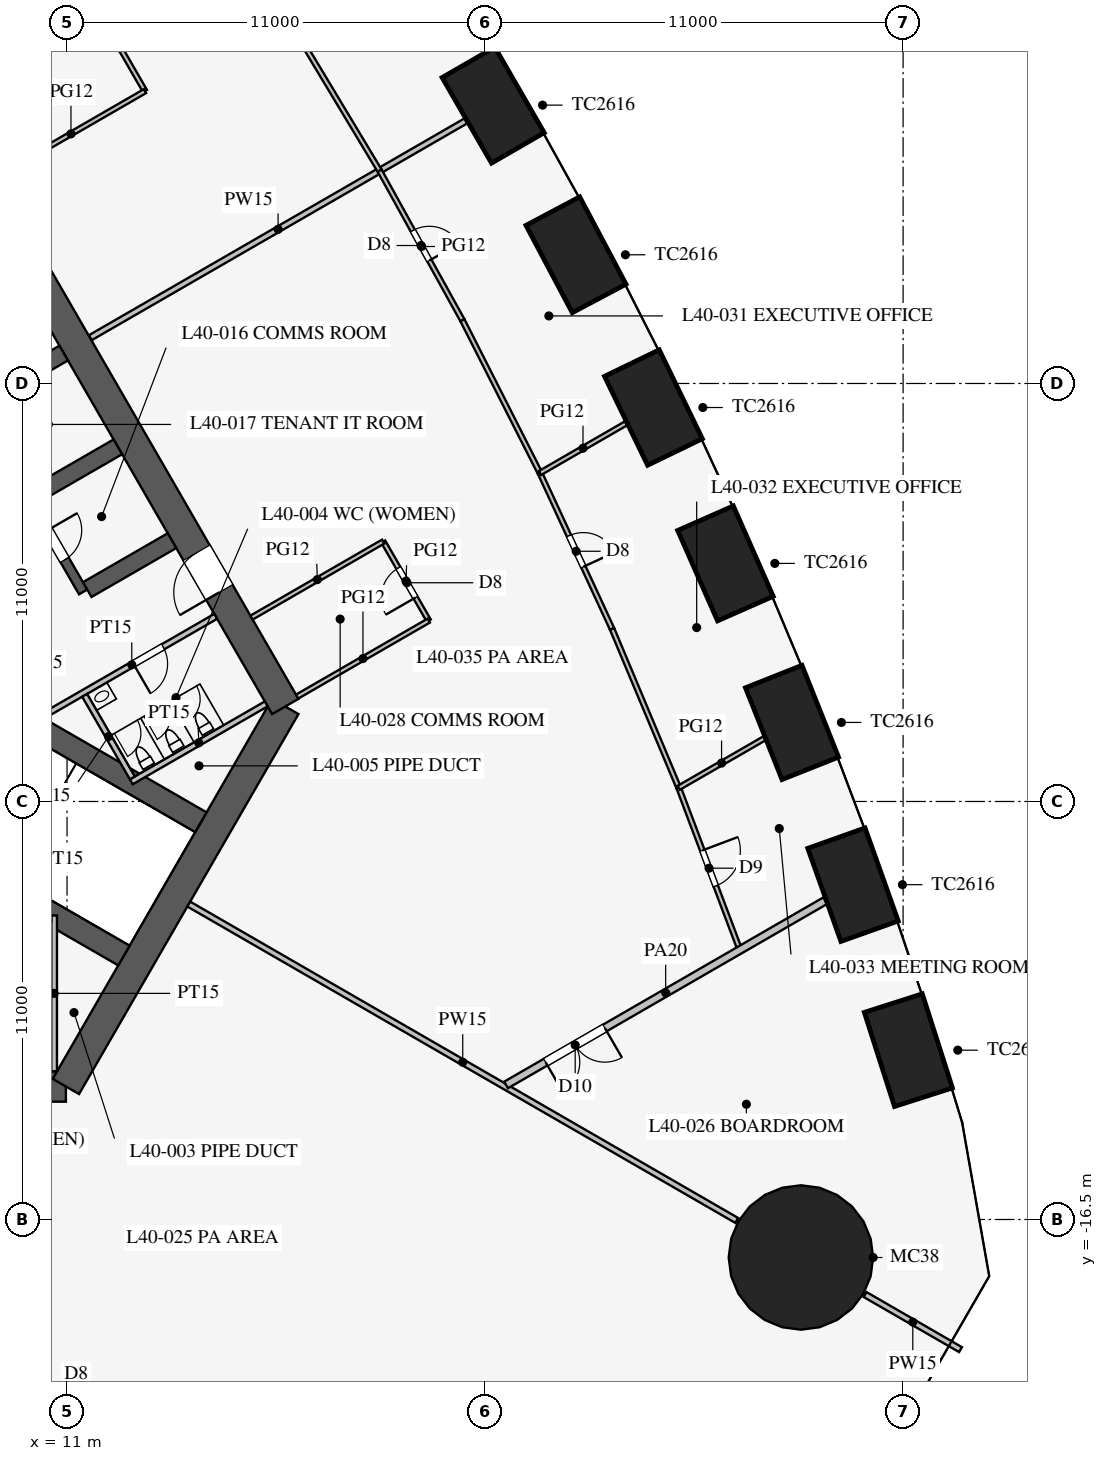
"""IFC4 building model, lengths in metres.
Left out: names, types, materials, properties, quantities, classifications, styles, units other than length and angle.
Written with IfcOpenShell. Run it as: python <this file> out.ifc"""

import sys

from ifc_helpers import new_model, si_unit, direction, frame, frame_2d, origin, origin_2d, place, context, subcontext, project, spatial, rectangle, circle, extrude, element, fill, save


model = new_model("IFC4")
c1 = context("Model", 3, precision=1e-05, world=origin(), true_north=direction((0.0, 1.0)))
c2 = subcontext(c1, "Body", "Model", "MODEL_VIEW")
j1 = project(units=[si_unit("LENGTHUNIT", "METRE"), si_unit("PLANEANGLEUNIT", "RADIAN")], contexts=[c1])
p1 = place(None, origin())
s1 = spatial("IfcSite", under=j1, at=p1, CompositionType="ELEMENT")
p2 = place(p1, origin())
s2 = spatial("IfcBuilding", under=s1, at=p2, CompositionType="ELEMENT")
p3 = place(p2, frame((0.0, 0.0, 174.5)))
s3 = spatial("IfcBuildingStorey", under=s2, at=p3, CompositionType="ELEMENT", Elevation=174.5)
for number, where, z_axis, x_axis in (
    (1, (33.139, -12.044, 0.0), (0.0, 0.0, 1.0), (-0.305, 0.952, 0.0)),
    (2, (31.682, -7.689, 0.0), (0.0, 0.0, 1.0), (-0.336, 0.942, 0.0)),
    (3, (30.077, -3.42, 0.0), (0.0, 0.0, 1.0), (-0.37, 0.929, 0.0)),
    (4, (28.325, 0.765, 0.0), (0.0, 0.0, 1.0), (-0.403, 0.915, 0.0)),
    (5, (26.43, 4.867, 0.0), (0.0, 0.0, 1.0), (-0.436, 0.9, 0.0)),
    (6, (24.393, 8.887, 0.0), (0.0, 0.0, 1.0), (-0.468, 0.883, 0.0)),
    (7, (22.213, 12.825, 0.0), (0.0, 0.0, 1.0), (-0.5, 0.866, 0.0)),
):
    element("IfcColumn", number, at=place(p3, frame(where, z_axis=z_axis, x_axis=x_axis)), inside=s3, PredefinedType="COLUMN", context=c2, shape_type="SweptSolid", body=[
        extrude(rectangle(XDim=2.6, YDim=1.6, at=origin_2d()), origin(), (0.0, 0.0, 1.0), 4.2),
    ])
p4 = place(p3, frame((30.311, -17.5, 0.0), z_axis=(0.0, 0.0, 1.0), x_axis=(1.0, 0.0, 0.0)))
e8 = element("IfcColumn", 8, at=p4, inside=s3, PredefinedType="COLUMN", context=c2, shape_type="SweptSolid", body=[
    extrude(circle(Radius=1.9, at=origin_2d()), origin(), (0.0, 0.0, 1.0), 4.2),
])
p5 = place(p3, frame((-10.97, -13.0, 0.0), z_axis=(0.0, 0.0, 1.0), x_axis=(1.0, 0.0, 0.0)))
e9 = element("IfcWall", 9, at=p5, inside=s3, PredefinedType="SHEAR", context=c2, shape_type="SweptSolid", body=[
    extrude(rectangle(XDim=21.939, YDim=0.8, at=frame_2d((10.97, 0.0))), origin(), (0.0, 0.0, 1.0), 4.2),
])
p6 = place(p5, frame((17.27, 0.0, 0.0)))
e10 = element("IfcOpeningElement", 10, at=p6, cuts=e9, PredefinedType="OPENING", context=c2, shape_type="SweptSolid", body=[
    extrude(rectangle(XDim=1.2, YDim=2.1, at=frame_2d((0.6, 1.05))), frame((0.0, 0.41, 0.0), z_axis=(0.0, -1.0, 0.0), x_axis=(1.0, 0.0, 0.0)), (0.0, 0.0, 1.0), 0.82),
])
p7 = place(p5, frame((3.47, 0.0, 0.0)))
e11 = element("IfcOpeningElement", 11, at=p7, cuts=e9, PredefinedType="OPENING", context=c2, shape_type="SweptSolid", body=[
    extrude(rectangle(XDim=1.2, YDim=2.1, at=frame_2d((0.6, 1.05))), frame((0.0, 0.41, 0.0), z_axis=(0.0, -1.0, 0.0), x_axis=(1.0, 0.0, 0.0)), (0.0, 0.0, 1.0), 0.82),
])
p8 = place(p3, frame((10.97, -13.0, 0.0), z_axis=(0.0, 0.0, 1.0), x_axis=(0.499995765644, 0.866027848477, 0.0)))
e12 = element("IfcWall", 12, at=p8, inside=s3, PredefinedType="SHEAR", context=c2, shape_type="SweptSolid", body=[
    extrude(rectangle(XDim=11.547, YDim=0.8, at=frame_2d((5.773, 0.0))), origin(), (0.0, 0.0, 1.0), 4.2),
])
p9 = place(p3, frame((16.743, -3.0, 0.0), z_axis=(0.0, 0.0, 1.0), x_axis=(-0.500002442456, 0.866023993627, 0.0)))
e13 = element("IfcWall", 13, at=p9, inside=s3, PredefinedType="SHEAR", context=c2, shape_type="SweptSolid", body=[
    extrude(rectangle(XDim=21.939, YDim=0.8, at=frame_2d((10.97, 0.0))), origin(), (0.0, 0.0, 1.0), 4.2),
])
p10 = place(p9, frame((17.27, 0.0, 0.0)))
e14 = element("IfcOpeningElement", 14, at=p10, cuts=e13, PredefinedType="OPENING", context=c2, shape_type="SweptSolid", body=[
    extrude(rectangle(XDim=1.2, YDim=2.1, at=frame_2d((0.6, 1.05))), frame((0.0, 0.41, 0.0), z_axis=(0.0, -1.0, 0.0), x_axis=(1.0, 0.0, 0.0)), (0.0, 0.0, 1.0), 0.82),
])
p11 = place(p9, frame((3.47, 0.0, 0.0)))
e15 = element("IfcOpeningElement", 15, at=p11, cuts=e13, PredefinedType="OPENING", context=c2, shape_type="SweptSolid", body=[
    extrude(rectangle(XDim=1.2, YDim=2.1, at=frame_2d((0.6, 1.05))), frame((0.0, 0.41, 0.0), z_axis=(0.0, -1.0, 0.0), x_axis=(1.0, 0.0, 0.0)), (0.0, 0.0, 1.0), 0.82),
])
p12 = place(p3, frame((11.424, 0.014, 0.0), z_axis=(0.0, 0.0, 1.0), x_axis=(-0.500001763848, 0.866024385424, 0.0)))
e16 = element("IfcWall", 16, at=p12, inside=s3, PredefinedType="SHEAR", context=c2, shape_type="SweptSolid", body=[
    extrude(rectangle(XDim=11.4, YDim=0.25, at=frame_2d((5.7, 0.0))), origin(), (0.0, 0.0, 1.0), 4.2),
])
p13 = place(p12, frame((0.975, 0.0, 0.0)))
e17 = element("IfcOpeningElement", 17, at=p13, cuts=e16, PredefinedType="OPENING", context=c2, shape_type="SweptSolid", body=[
    extrude(rectangle(XDim=0.9, YDim=2.1, at=frame_2d((0.45, 1.05))), frame((0.0, 0.135, 0.0), z_axis=(0.0, -1.0, 0.0), x_axis=(1.0, 0.0, 0.0)), (0.0, 0.0, 1.0), 0.27),
])
p14 = place(p12, frame((3.825, 0.0, 0.0)))
e18 = element("IfcOpeningElement", 18, at=p14, cuts=e16, PredefinedType="OPENING", context=c2, shape_type="SweptSolid", body=[
    extrude(rectangle(XDim=0.9, YDim=2.1, at=frame_2d((0.45, 1.05))), frame((0.0, 0.135, 0.0), z_axis=(0.0, -1.0, 0.0), x_axis=(1.0, 0.0, 0.0)), (0.0, 0.0, 1.0), 0.27),
])
for number, where, z_axis, x_axis in (
    (19, (11.532, 0.076, 0.0), (0.0, 0.0, 1.0), (0.866, 0.5, 0.0)),
    (20, (10.107, 2.544, 0.0), (0.0, 0.0, 1.0), (0.866, 0.5, 0.0)),
    (21, (8.682, 5.012, 0.0), (0.0, 0.0, 1.0), (0.866, 0.5, 0.0)),
):
    element("IfcWall", number, at=place(p3, frame(where, z_axis=z_axis, x_axis=x_axis)), inside=s3, PredefinedType="SHEAR", context=c2, shape_type="SweptSolid", body=[
        extrude(rectangle(XDim=2.575, YDim=0.45, at=frame_2d((1.288, 0.0))), origin(), (0.0, 0.0, 1.0), 4.2),
    ])
for number, where, z_axis, x_axis in (
    (22, (4.638, -5.016, 0.0), (0.0, 0.0, 1.0), (0.866, -0.5, 0.0)),
    (23, (6.663, -1.509, 0.0), (0.0, 0.0, 1.0), (0.866, -0.5, 0.0)),
):
    element("IfcWall", number, at=place(p3, frame(where, z_axis=z_axis, x_axis=x_axis)), inside=s3, PredefinedType="SHEAR", context=c2, shape_type="SweptSolid", body=[
        extrude(rectangle(XDim=9.075, YDim=0.6, at=frame_2d((4.538, 0.0))), origin(), (0.0, 0.0, 1.0), 4.2),
    ])
p15 = place(p3, frame((10.495, -3.178, 0.0), z_axis=(0.0, 0.0, 1.0), x_axis=(0.86602216432, 0.500005610874, 0.0)))
e24 = element("IfcWall", 24, at=p15, inside=s3, PredefinedType="PARTITIONING", context=c2, shape_type="SweptSolid", body=[
    extrude(rectangle(XDim=5.1, YDim=0.15, at=frame_2d((2.55, 0.0))), origin(), (0.0, 0.0, 1.0), 3.95),
])
p16 = place(p15, frame((2.6, 0.0, 0.0)))
e25 = element("IfcOpeningElement", 25, at=p16, cuts=e24, PredefinedType="OPENING", context=c2, shape_type="SweptSolid", body=[
    extrude(rectangle(XDim=0.9, YDim=2.1, at=frame_2d((0.45, 1.05))), frame((0.0, 0.085, 0.0), z_axis=(0.0, -1.0, 0.0), x_axis=(1.0, 0.0, 0.0)), (0.0, 0.0, 1.0), 0.17),
])
for number, where, z_axis, x_axis in (
    (26, (10.66, -8.5, 0.0), (0.0, 0.0, 1.0), (0.0, -1.0, 0.0)),
    (27, (12.691, -4.982, 0.0), (0.0, 0.0, 1.0), (0.866, 0.5, 0.0)),
):
    element("IfcWall", number, at=place(p3, frame(where, z_axis=z_axis, x_axis=x_axis)), inside=s3, PredefinedType="PARTITIONING", context=c2, shape_type="SweptSolid", body=[
        extrude(rectangle(XDim=4.1, YDim=0.15, at=frame_2d((2.05, 0.0))), origin(), (0.0, 0.0, 1.0), 3.95),
    ])
p17 = place(p3, frame((11.464, -2.706, 0.0), z_axis=(0.0, 0.0, 1.0), x_axis=(0.50001992892, -0.866013897511, 0.0)))
e28 = element("IfcWall", 28, at=p17, inside=s3, PredefinedType="PARTITIONING", context=c2, shape_type="SweptSolid", body=[
    extrude(rectangle(XDim=2.51, YDim=0.15, at=frame_2d((1.255, 0.0))), origin(), (0.0, 0.0, 1.0), 3.95),
])
p18 = place(p3, frame((14.203, -8.2, 0.0), z_axis=(0.0, 0.0, 1.0), x_axis=(0.866024668836, -0.500001272966, 0.0)))
e29 = element("IfcWall", 29, at=p18, inside=s3, PredefinedType="PARTITIONING", context=c2, shape_type="SweptSolid", body=[
    extrude(rectangle(XDim=16.65, YDim=0.15, at=frame_2d((8.325, 0.0))), origin(), (0.0, 0.0, 1.0), 1.95),
])
p19 = place(p3, frame((32.0, -18.475, 0.0), z_axis=(0.0, 0.0, 1.0), x_axis=(0.866042548026, -0.499970304126, 0.0)))
e30 = element("IfcWall", 30, at=p19, inside=s3, PredefinedType="PARTITIONING", context=c2, shape_type="SweptSolid", body=[
    extrude(rectangle(XDim=2.899, YDim=0.15, at=frame_2d((1.45, 0.0))), origin(), (0.0, 0.0, 1.0), 1.95),
])
p20 = place(p3, frame((11.613, 6.705, 0.0), z_axis=(0.0, 0.0, 1.0), x_axis=(0.866026306654, 0.499998436182, 0.0)))
e31 = element("IfcWall", 31, at=p20, inside=s3, PredefinedType="PARTITIONING", context=c2, shape_type="SweptSolid", body=[
    extrude(rectangle(XDim=11.41, YDim=0.15, at=frame_2d((5.705, 0.0))), origin(), (0.0, 0.0, 1.0), 2.15),
])
p21 = place(p3, frame((13.052, 13.194, 0.0), z_axis=(0.0, 0.0, 1.0), x_axis=(-0.499977259774, 0.866038532462, 0.0)))
e32 = element("IfcWall", 32, at=p21, inside=s3, PredefinedType="PARTITIONING", context=c2, shape_type="SweptSolid", body=[
    extrude(rectangle(XDim=4.7, YDim=0.12, at=frame_2d((2.35, 0.0))), origin(), (0.0, 0.0, 1.0), 2.9),
])
p22 = place(p21, frame((1.45, 0.0, 0.15)))
e33 = element("IfcOpeningElement", 33, at=p22, cuts=e32, PredefinedType="OPENING", context=c2, shape_type="SweptSolid", body=[
    extrude(rectangle(XDim=1.8, YDim=2.1, at=frame_2d((0.9, 1.05))), frame((0.0, 0.07, 0.0), z_axis=(0.0, -1.0, 0.0), x_axis=(1.0, 0.0, 0.0)), (0.0, 0.0, 1.0), 0.14),
])
p23 = place(p3, frame((20.519, -0.74, 0.0), z_axis=(0.0, 0.0, 1.0), x_axis=(-0.499957262057, 0.866050077142, 0.0)))
e34 = element("IfcWall", 34, at=p23, inside=s3, PredefinedType="PARTITIONING", context=c2, shape_type="SweptSolid", body=[
    extrude(rectangle(XDim=2.4, YDim=0.12, at=frame_2d((1.2, 0.0))), origin(), (0.0, 0.0, 1.0), 2.9),
])
p24 = place(p23, frame((0.7, 0.0, 0.15)))
e35 = element("IfcOpeningElement", 35, at=p24, cuts=e34, PredefinedType="OPENING", context=c2, shape_type="SweptSolid", body=[
    extrude(rectangle(XDim=0.9, YDim=2.1, at=frame_2d((0.45, 1.05))), frame((0.0, 0.07, 0.0), z_axis=(0.0, -1.0, 0.0), x_axis=(1.0, 0.0, 0.0)), (0.0, 0.0, 1.0), 0.14),
])
p25 = place(p3, frame((9.155, 10.944, 0.0), z_axis=(0.0, 0.0, 1.0), x_axis=(0.866017533419, 0.500013631625, 0.0)))
e36 = element("IfcWall", 36, at=p25, inside=s3, PredefinedType="PARTITIONING", context=c2, shape_type="SweptSolid", body=[
    extrude(rectangle(XDim=4.5, YDim=0.12, at=frame_2d((2.25, 0.0))), origin(), (0.0, 0.0, 1.0), 2.9),
])
for number, where, z_axis, x_axis in (
    (37, (17.055, -2.74, 0.0), (0.0, 0.0, 1.0), (0.866, 0.5, 0.0)),
    (38, (15.855, -0.661, 0.0), (0.0, 0.0, 1.0), (0.866, 0.5, 0.0)),
):
    element("IfcWall", number, at=place(p3, frame(where, z_axis=z_axis, x_axis=x_axis)), inside=s3, PredefinedType="PARTITIONING", context=c2, shape_type="SweptSolid", body=[
        extrude(rectangle(XDim=4.0, YDim=0.12, at=frame_2d((2.0, 0.0))), origin(), (0.0, 0.0, 1.0), 2.9),
    ])
p26 = place(p3, frame((19.226, 11.1, 0.0), z_axis=(0.0, 0.0, 1.0), x_axis=(-0.515548366618, 0.856860479703, 0.0)))
e39 = element("IfcWall", 39, at=p26, inside=s3, PredefinedType="PARTITIONING", context=c2, shape_type="SweptSolid", body=[
    extrude(rectangle(XDim=4.501, YDim=0.12, at=frame_2d((2.25, 0.0))), origin(), (0.0, 0.0, 1.0), 2.9),
])
p27 = place(p3, frame((25.342, -0.958, 0.0), z_axis=(0.0, 0.0, 1.0), x_axis=(-0.419883773418, 0.907577884713, 0.0)))
e40 = element("IfcWall", 40, at=p27, inside=s3, PredefinedType="PARTITIONING", context=c2, shape_type="SweptSolid", body=[
    extrude(rectangle(XDim=4.519, YDim=0.12, at=frame_2d((2.259, 0.0))), origin(), (0.0, 0.0, 1.0), 2.9),
])
p28 = place(p27, frame((1.8, 0.0, 0.15)))
e41 = element("IfcOpeningElement", 41, at=p28, cuts=e40, PredefinedType="OPENING", context=c2, shape_type="SweptSolid", body=[
    extrude(rectangle(XDim=0.9, YDim=2.1, at=frame_2d((0.45, 1.05))), frame((0.0, 0.07, 0.0), z_axis=(0.0, -1.0, 0.0), x_axis=(1.0, 0.0, 0.0)), (0.0, 0.0, 1.0), 0.14),
])
p29 = place(p3, frame((27.096, -5.141, 0.0), z_axis=(0.0, 0.0, 1.0), x_axis=(-0.386807881778, 0.922160323693, 0.0)))
e42 = element("IfcWall", 42, at=p29, inside=s3, PredefinedType="PARTITIONING", context=c2, shape_type="SweptSolid", body=[
    extrude(rectangle(XDim=4.536, YDim=0.12, at=frame_2d((2.268, 0.0))), origin(), (0.0, 0.0, 1.0), 2.9),
])
p30 = place(p3, frame((28.706, -9.408, 0.0), z_axis=(0.0, 0.0, 1.0), x_axis=(-0.352894560512, 0.93566309597, 0.0)))
e43 = element("IfcWall", 43, at=p30, inside=s3, PredefinedType="PARTITIONING", context=c2, shape_type="SweptSolid", body=[
    extrude(rectangle(XDim=4.561, YDim=0.12, at=frame_2d((2.28, 0.0))), origin(), (0.0, 0.0, 1.0), 2.9),
])
p31 = place(p30, frame((1.8, 0.0, 0.15)))
e44 = element("IfcOpeningElement", 44, at=p31, cuts=e43, PredefinedType="OPENING", context=c2, shape_type="SweptSolid", body=[
    extrude(rectangle(XDim=1.0, YDim=2.1, at=frame_2d((0.5, 1.05))), frame((0.0, 0.07, 0.0), z_axis=(0.0, -1.0, 0.0), x_axis=(1.0, 0.0, 0.0)), (0.0, 0.0, 1.0), 0.14),
])
p32 = place(p3, frame((21.405, 7.162, 0.0), z_axis=(0.0, 0.0, 1.0), x_axis=(-0.484292898211, 0.874905931368, 0.0)))
e45 = element("IfcWall", 45, at=p32, inside=s3, PredefinedType="PARTITIONING", context=c2, shape_type="SweptSolid", body=[
    extrude(rectangle(XDim=4.501, YDim=0.12, at=frame_2d((2.25, 0.0))), origin(), (0.0, 0.0, 1.0), 2.9),
])
p33 = place(p32, frame((1.8, 0.0, 0.15)))
e46 = element("IfcOpeningElement", 46, at=p33, cuts=e45, PredefinedType="OPENING", context=c2, shape_type="SweptSolid", body=[
    extrude(rectangle(XDim=0.9, YDim=2.1, at=frame_2d((0.45, 1.05))), frame((0.0, 0.07, 0.0), z_axis=(0.0, -1.0, 0.0), x_axis=(1.0, 0.0, 0.0)), (0.0, 0.0, 1.0), 0.14),
])
p34 = place(p3, frame((23.444, 3.143, 0.0), z_axis=(0.0, 0.0, 1.0), x_axis=(-0.452471679136, 0.891778772779, 0.0)))
e47 = element("IfcWall", 47, at=p34, inside=s3, PredefinedType="PARTITIONING", context=c2, shape_type="SweptSolid", body=[
    extrude(rectangle(XDim=4.507, YDim=0.12, at=frame_2d((2.253, 0.0))), origin(), (0.0, 0.0, 1.0), 2.9),
])
p35 = place(p3, frame((27.096, -5.141, 0.0), z_axis=(0.0, 0.0, 1.0), x_axis=(0.866012205188, 0.500022859943, 0.0)))
e48 = element("IfcWall", 48, at=p35, inside=s3, PredefinedType="PARTITIONING", context=c2, shape_type="SweptSolid", body=[
    extrude(rectangle(XDim=2.603, YDim=0.12, at=frame_2d((1.302, 0.0))), origin(), (0.0, 0.0, 1.0), 2.15),
])
p36 = place(p3, frame((22.553, -12.96, 0.0), z_axis=(0.0, 0.0, 1.0), x_axis=(0.866028367999, 0.499994865794, 0.0)))
e49 = element("IfcWall", 49, at=p36, inside=s3, PredefinedType="PARTITIONING", context=c2, shape_type="SweptSolid", body=[
    extrude(rectangle(XDim=9.697, YDim=0.2, at=frame_2d((4.849, 0.0))), origin(), (0.0, 0.0, 1.0), 2.35),
])
p37 = place(p36, frame((1.2, 0.0, 0.15)))
e50 = element("IfcOpeningElement", 50, at=p37, cuts=e49, PredefinedType="OPENING", context=c2, shape_type="SweptSolid", body=[
    extrude(rectangle(XDim=1.8, YDim=2.1, at=frame_2d((0.9, 1.05))), frame((0.0, 0.11, 0.0), z_axis=(0.0, -1.0, 0.0), x_axis=(1.0, 0.0, 0.0)), (0.0, 0.0, 1.0), 0.22),
])
p38 = place(p3, frame((23.444, 3.143, 0.0), z_axis=(0.0, 0.0, 1.0), x_axis=(0.866011491631, 0.500024095782, 0.0)))
e51 = element("IfcWall", 51, at=p38, inside=s3, PredefinedType="PARTITIONING", context=c2, shape_type="SweptSolid", body=[
    extrude(rectangle(XDim=2.615, YDim=0.12, at=frame_2d((1.308, 0.0))), origin(), (0.0, 0.0, 1.0), 2.35),
])
p39 = place(p16, frame((0.9, 0.0, 0.0), z_axis=(0.0, 0.0, 1.0), x_axis=(-1.0, 0.0, 0.0)))
e52 = element("IfcDoor", 52, at=p39, inside=s3, OperationType="SINGLE_SWING_RIGHT", PredefinedType="DOOR", context=c2, shape_type="SweptSolid", body=[
    extrude(rectangle(XDim=0.9, YDim=2.1, at=frame_2d((0.45, 1.05))), frame((0.0, 0.025, 0.0), z_axis=(0.0, -1.0, 0.0), x_axis=(1.0, 0.0, 0.0)), (0.0, 0.0, 1.0), 0.05),
])
fill(e25, e52)
p40 = place(p11, origin())
e53 = element("IfcDoor", 53, at=p40, inside=s3, OperationType="SINGLE_SWING_LEFT", PredefinedType="DOOR", context=c2, shape_type="SweptSolid", body=[
    extrude(rectangle(XDim=1.2, YDim=2.1, at=frame_2d((0.6, 1.05))), frame((0.0, 0.025, 0.0), z_axis=(0.0, -1.0, 0.0), x_axis=(1.0, 0.0, 0.0)), (0.0, 0.0, 1.0), 0.05),
])
fill(e15, e53)
p41 = place(p13, frame((0.9, 0.0, 0.0), z_axis=(0.0, 0.0, 1.0), x_axis=(-1.0, 0.0, 0.0)))
e54 = element("IfcDoor", 54, at=p41, inside=s3, OperationType="SINGLE_SWING_LEFT", PredefinedType="DOOR", context=c2, shape_type="SweptSolid", body=[
    extrude(rectangle(XDim=0.9, YDim=2.1, at=frame_2d((0.45, 1.05))), frame((0.0, 0.025, 0.0), z_axis=(0.0, -1.0, 0.0), x_axis=(1.0, 0.0, 0.0)), (0.0, 0.0, 1.0), 0.05),
])
fill(e17, e54)
p42 = place(p37, frame((1.8, 0.0, 0.0), z_axis=(0.0, 0.0, 1.0), x_axis=(-1.0, 0.0, 0.0)))
e55 = element("IfcDoor", 55, at=p42, inside=s3, OperationType="DOUBLE_DOOR_SINGLE_SWING", PredefinedType="DOOR", context=c2, shape_type="SweptSolid", body=[
    extrude(rectangle(XDim=1.8, YDim=2.1, at=frame_2d((0.9, 1.05))), frame((0.0, 0.025, 0.0), z_axis=(0.0, -1.0, 0.0), x_axis=(1.0, 0.0, 0.0)), (0.0, 0.0, 1.0), 0.05),
])
fill(e50, e55)
p43 = place(p24, origin())
e56 = element("IfcDoor", 56, at=p43, inside=s3, OperationType="SINGLE_SWING_LEFT", PredefinedType="DOOR", context=c2, shape_type="SweptSolid", body=[
    extrude(rectangle(XDim=0.9, YDim=2.1, at=frame_2d((0.45, 1.05))), frame((0.0, 0.025, 0.0), z_axis=(0.0, -1.0, 0.0), x_axis=(1.0, 0.0, 0.0)), (0.0, 0.0, 1.0), 0.05),
])
fill(e35, e56)
p44 = place(p33, frame((0.9, 0.0, 0.0), z_axis=(0.0, 0.0, 1.0), x_axis=(-1.0, 0.0, 0.0)))
e57 = element("IfcDoor", 57, at=p44, inside=s3, OperationType="SINGLE_SWING_RIGHT", PredefinedType="DOOR", context=c2, shape_type="SweptSolid", body=[
    extrude(rectangle(XDim=0.9, YDim=2.1, at=frame_2d((0.45, 1.05))), frame((0.0, 0.025, 0.0), z_axis=(0.0, -1.0, 0.0), x_axis=(1.0, 0.0, 0.0)), (0.0, 0.0, 1.0), 0.05),
])
fill(e46, e57)
p45 = place(p28, frame((0.9, 0.0, 0.0), z_axis=(0.0, 0.0, 1.0), x_axis=(-1.0, 0.0, 0.0)))
e58 = element("IfcDoor", 58, at=p45, inside=s3, OperationType="SINGLE_SWING_RIGHT", PredefinedType="DOOR", context=c2, shape_type="SweptSolid", body=[
    extrude(rectangle(XDim=0.9, YDim=2.1, at=frame_2d((0.45, 1.05))), frame((0.0, 0.025, 0.0), z_axis=(0.0, -1.0, 0.0), x_axis=(1.0, 0.0, 0.0)), (0.0, 0.0, 1.0), 0.05),
])
fill(e41, e58)
p46 = place(p31, frame((1.0, 0.0, 0.0), z_axis=(0.0, 0.0, 1.0), x_axis=(-1.0, 0.0, 0.0)))
e59 = element("IfcDoor", 59, at=p46, inside=s3, OperationType="SINGLE_SWING_LEFT", PredefinedType="DOOR", context=c2, shape_type="SweptSolid", body=[
    extrude(rectangle(XDim=1.0, YDim=2.1, at=frame_2d((0.5, 1.05))), frame((0.0, 0.025, 0.0), z_axis=(0.0, -1.0, 0.0), x_axis=(1.0, 0.0, 0.0)), (0.0, 0.0, 1.0), 0.05),
])
fill(e44, e59)
save(model, sys.argv[1])
